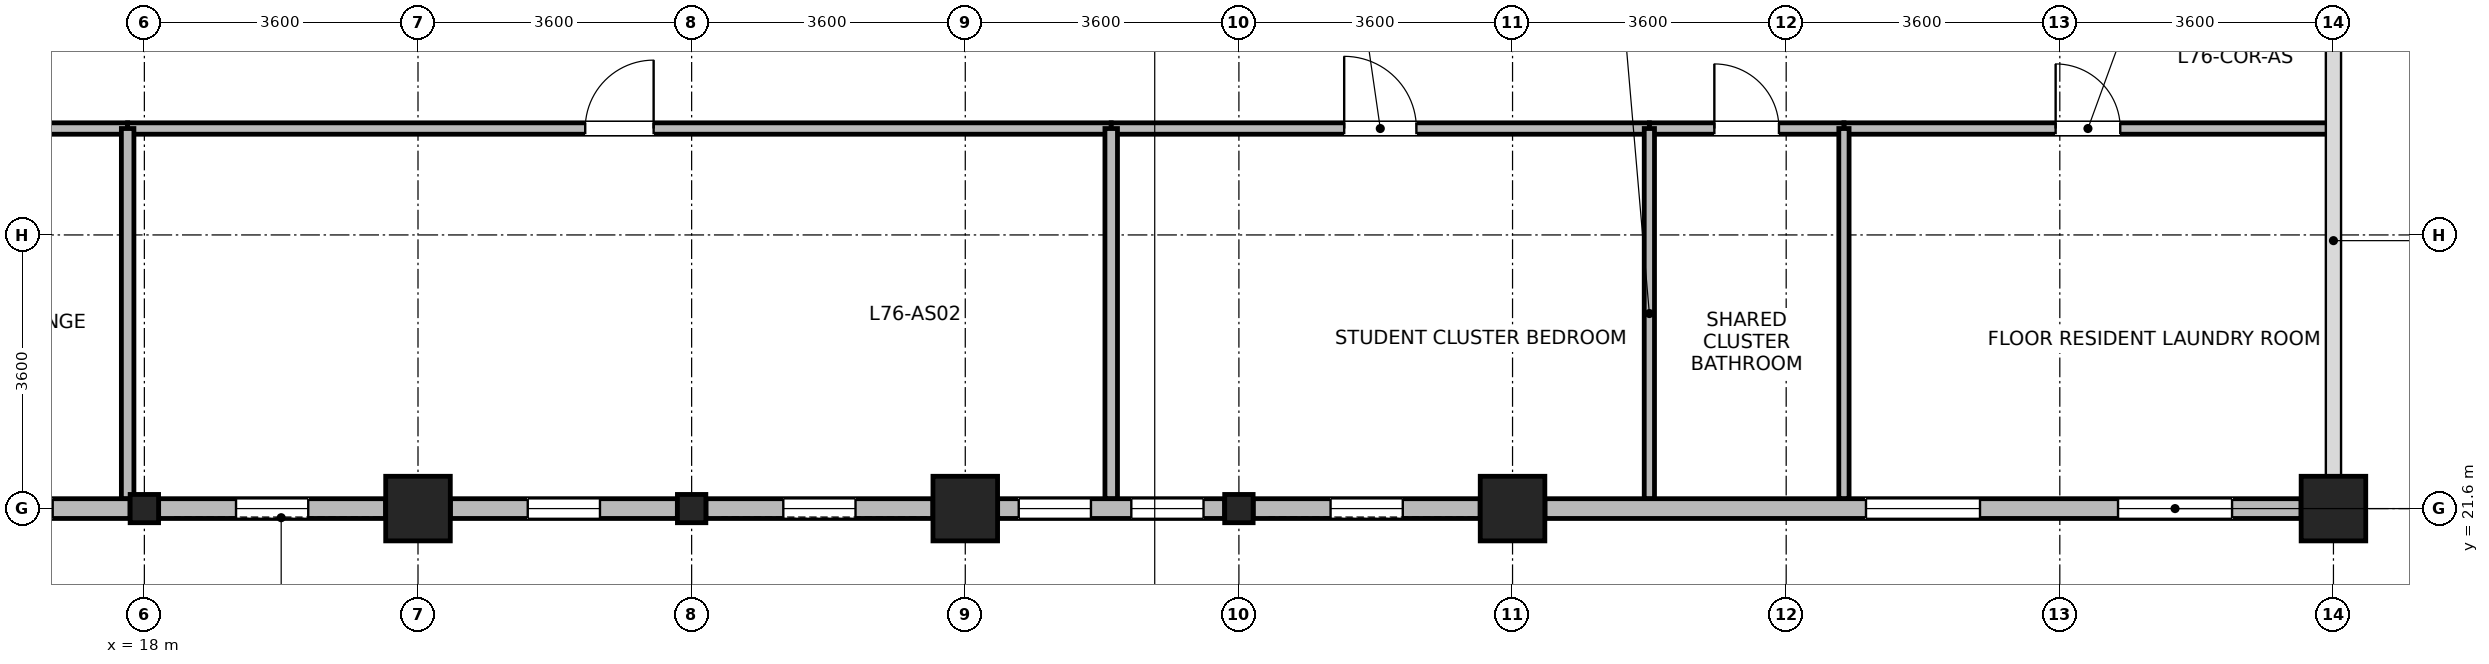
"""IFC4 building model, lengths in metres.
Left out: names, types, materials, properties, quantities, classifications, styles, units other than length and angle.
Written with IfcOpenShell. Run it as: python <this file> out.ifc"""

import sys

from ifc_helpers import new_model, si_unit, direction, frame, frame_2d, origin, origin_2d, place, context, subcontext, project, spatial, rectangle, i_section, extrude, source, transform, mapped, element, fill, save


model = new_model("IFC4")
c1 = context("Model", 3, precision=1e-05, world=origin(), true_north=direction((0.0, 1.0)))
c2 = subcontext(c1, "Body", "Model", "MODEL_VIEW")
j1 = project(units=[si_unit("LENGTHUNIT", "METRE"), si_unit("PLANEANGLEUNIT", "RADIAN")], contexts=[c1])
p1 = place(None, origin())
s1 = spatial("IfcSite", under=j1, at=p1, CompositionType="ELEMENT")
p2 = place(p1, origin())
s2 = spatial("IfcBuilding", under=s1, at=p2, CompositionType="ELEMENT")
p3 = place(p2, frame((0.0, 0.0, 294.3)))
s3 = spatial("IfcBuildingStorey", under=s2, at=p3, CompositionType="ELEMENT", Elevation=294.3)
m1 = source(origin(), c2, "Body", "SweptSolid", [
    extrude(rectangle(XDim=0.85, YDim=0.85, at=origin_2d()), origin(), (0.0, 0.0, 1.0), 3.7),
])
for number, where, z_axis, x_axis in (
    (1, (21.6, 21.6, 0.0), (0.0, 0.0, 1.0), (1.0, 0.0, 0.0)),
    (2, (28.8, 21.6, 0.0), (0.0, 0.0, 1.0), (1.0, 0.0, 0.0)),
    (3, (36.0, 21.6, 0.0), (0.0, 0.0, 1.0), (1.0, 0.0, 0.0)),
    (4, (46.8, 21.6, 0.0), (0.0, 0.0, 1.0), (1.0, 0.0, 0.0)),
):
    element("IfcColumn", number, at=place(p3, frame(where, z_axis=z_axis, x_axis=x_axis)), inside=s3, PredefinedType="COLUMN", context=c2, shape_type="MappedRepresentation", body=[
        mapped(m1, transform((0.0, 0.0, 0.0), x_axis=(1.0, 0.0, 0.0), y_axis=(0.0, 1.0, 0.0), z_axis=(0.0, 0.0, 1.0), scale=1.0)),
    ])
m2 = source(origin(), c2, "Body", "SweptSolid", [
    extrude(i_section(OverallWidth=0.374, OverallDepth=0.372, WebThickness=0.015, FlangeThickness=0.026, FilletRadius=0.015, at=origin_2d()), origin(), (0.0, 0.0, 1.0), 3.7),
])
for number, where, z_axis, x_axis in (
    (5, (18.0, 21.6, 0.0), (0.0, 0.0, 1.0), (1.0, 0.0, 0.0)),
    (6, (25.2, 21.6, 0.0), (0.0, 0.0, 1.0), (1.0, 0.0, 0.0)),
    (7, (32.4, 21.6, 0.0), (0.0, 0.0, 1.0), (1.0, 0.0, 0.0)),
):
    element("IfcColumn", number, at=place(p3, frame(where, z_axis=z_axis, x_axis=x_axis)), inside=s3, PredefinedType="COLUMN", context=c2, shape_type="MappedRepresentation", body=[
        mapped(m2, transform((0.0, 0.0, 0.0), x_axis=(1.0, 0.0, 0.0), y_axis=(0.0, 1.0, 0.0), z_axis=(0.0, 0.0, 1.0), scale=1.0)),
    ])
p4 = place(p3, frame((17.812, 21.6, 0.0), z_axis=(0.0, 0.0, 1.0), x_axis=(-1.0, 0.0, 0.0)))
e8 = element("IfcWall", 8, at=p4, inside=s3, PredefinedType="STANDARD", context=c2, shape_type="SweptSolid", body=[
    extrude(rectangle(XDim=2.986, YDim=0.26, at=frame_2d((1.493, 0.0))), origin(), (0.0, 0.0, 1.0), 2.98),
])
p5 = place(p4, frame((1.018, 0.0, 0.85)))
e9 = element("IfcOpeningElement", 9, at=p5, cuts=e8, PredefinedType="OPENING", context=c2, shape_type="SweptSolid", body=[
    extrude(rectangle(XDim=0.95, YDim=1.75, at=frame_2d((0.475, 0.875))), frame((0.0, 0.14, 0.0), z_axis=(0.0, -1.0, 0.0), x_axis=(1.0, 0.0, 0.0)), (0.0, 0.0, 1.0), 0.28),
])
p6 = place(p3, frame((21.174, 21.6, 0.0), z_axis=(0.0, 0.0, 1.0), x_axis=(-1.0, 0.0, 0.0)))
e10 = element("IfcWall", 10, at=p6, inside=s3, PredefinedType="STANDARD", context=c2, shape_type="SweptSolid", body=[
    extrude(rectangle(XDim=2.986, YDim=0.26, at=frame_2d((1.493, 0.0))), origin(), (0.0, 0.0, 1.0), 2.98),
])
p7 = place(p6, frame((1.018, 0.0, 0.85)))
e11 = element("IfcOpeningElement", 11, at=p7, cuts=e10, PredefinedType="OPENING", context=c2, shape_type="SweptSolid", body=[
    extrude(rectangle(XDim=0.95, YDim=1.75, at=frame_2d((0.475, 0.875))), frame((0.0, 0.14, 0.0), z_axis=(0.0, -1.0, 0.0), x_axis=(1.0, 0.0, 0.0)), (0.0, 0.0, 1.0), 0.28),
])
p8 = place(p3, frame((25.012, 21.6, 0.0), z_axis=(0.0, 0.0, 1.0), x_axis=(-1.0, 0.0, 0.0)))
e12 = element("IfcWall", 12, at=p8, inside=s3, PredefinedType="STANDARD", context=c2, shape_type="SweptSolid", body=[
    extrude(rectangle(XDim=2.986, YDim=0.26, at=frame_2d((1.493, 0.0))), origin(), (0.0, 0.0, 1.0), 2.98),
])
p9 = place(p8, frame((1.018, 0.0, 0.85)))
e13 = element("IfcOpeningElement", 13, at=p9, cuts=e12, PredefinedType="OPENING", context=c2, shape_type="SweptSolid", body=[
    extrude(rectangle(XDim=0.95, YDim=1.75, at=frame_2d((0.475, 0.875))), frame((0.0, 0.14, 0.0), z_axis=(0.0, -1.0, 0.0), x_axis=(1.0, 0.0, 0.0)), (0.0, 0.0, 1.0), 0.28),
])
p10 = place(p3, frame((28.374, 21.6, 0.0), z_axis=(0.0, 0.0, 1.0), x_axis=(-1.0, 0.0, 0.0)))
e14 = element("IfcWall", 14, at=p10, inside=s3, PredefinedType="STANDARD", context=c2, shape_type="SweptSolid", body=[
    extrude(rectangle(XDim=2.986, YDim=0.26, at=frame_2d((1.493, 0.0))), origin(), (0.0, 0.0, 1.0), 2.98),
])
p11 = place(p10, frame((1.018, 0.0, 0.85)))
e15 = element("IfcOpeningElement", 15, at=p11, cuts=e14, PredefinedType="OPENING", context=c2, shape_type="SweptSolid", body=[
    extrude(rectangle(XDim=0.95, YDim=1.75, at=frame_2d((0.475, 0.875))), frame((0.0, 0.14, 0.0), z_axis=(0.0, -1.0, 0.0), x_axis=(1.0, 0.0, 0.0)), (0.0, 0.0, 1.0), 0.28),
])
p12 = place(p3, frame((32.212, 21.6, 0.0), z_axis=(0.0, 0.0, 1.0), x_axis=(-1.0, 0.0, 0.0)))
e16 = element("IfcWall", 16, at=p12, inside=s3, PredefinedType="STANDARD", context=c2, shape_type="SweptSolid", body=[
    extrude(rectangle(XDim=2.986, YDim=0.26, at=frame_2d((1.493, 0.0))), origin(), (0.0, 0.0, 1.0), 2.98),
])
p13 = place(p12, frame((0.278, 0.0, 0.85)))
e17 = element("IfcOpeningElement", 17, at=p13, cuts=e16, PredefinedType="OPENING", context=c2, shape_type="SweptSolid", body=[
    extrude(rectangle(XDim=0.95, YDim=1.75, at=frame_2d((0.475, 0.875))), frame((0.0, 0.14, 0.0), z_axis=(0.0, -1.0, 0.0), x_axis=(1.0, 0.0, 0.0)), (0.0, 0.0, 1.0), 0.28),
])
p14 = place(p12, frame((1.759, 0.0, 0.85)))
e18 = element("IfcOpeningElement", 18, at=p14, cuts=e16, PredefinedType="OPENING", context=c2, shape_type="SweptSolid", body=[
    extrude(rectangle(XDim=0.95, YDim=1.75, at=frame_2d((0.475, 0.875))), frame((0.0, 0.14, 0.0), z_axis=(0.0, -1.0, 0.0), x_axis=(1.0, 0.0, 0.0)), (0.0, 0.0, 1.0), 0.28),
])
p15 = place(p3, frame((35.574, 21.6, 0.0), z_axis=(0.0, 0.0, 1.0), x_axis=(-1.0, 0.0, 0.0)))
e19 = element("IfcWall", 19, at=p15, inside=s3, PredefinedType="STANDARD", context=c2, shape_type="SweptSolid", body=[
    extrude(rectangle(XDim=2.986, YDim=0.26, at=frame_2d((1.493, 0.0))), origin(), (0.0, 0.0, 1.0), 2.98),
])
p16 = place(p15, frame((1.018, 0.0, 0.85)))
e20 = element("IfcOpeningElement", 20, at=p16, cuts=e19, PredefinedType="OPENING", context=c2, shape_type="SweptSolid", body=[
    extrude(rectangle(XDim=0.95, YDim=1.75, at=frame_2d((0.475, 0.875))), frame((0.0, 0.14, 0.0), z_axis=(0.0, -1.0, 0.0), x_axis=(1.0, 0.0, 0.0)), (0.0, 0.0, 1.0), 0.28),
])
p17 = place(p3, frame((46.374, 21.6, 0.0), z_axis=(0.0, 0.0, 1.0), x_axis=(-1.0, 0.0, 0.0)))
e21 = element("IfcWall", 21, at=p17, inside=s3, PredefinedType="STANDARD", context=c2, shape_type="SweptSolid", body=[
    extrude(rectangle(XDim=9.948, YDim=0.26, at=frame_2d((4.974, 0.0))), origin(), (0.0, 0.0, 1.0), 2.98),
])
p18 = place(p17, frame((0.908, 0.0, 0.85)))
e22 = element("IfcOpeningElement", 22, at=p18, cuts=e21, PredefinedType="OPENING", context=c2, shape_type="SweptSolid", body=[
    extrude(rectangle(XDim=1.5, YDim=1.85, at=frame_2d((0.75, 0.925))), frame((0.0, 0.14, 0.0), z_axis=(0.0, -1.0, 0.0), x_axis=(1.0, 0.0, 0.0)), (0.0, 0.0, 1.0), 0.28),
])
p19 = place(p17, frame((4.224, 0.0, 0.85)))
e23 = element("IfcOpeningElement", 23, at=p19, cuts=e21, PredefinedType="OPENING", context=c2, shape_type="SweptSolid", body=[
    extrude(rectangle(XDim=1.5, YDim=1.85, at=frame_2d((0.75, 0.925))), frame((0.0, 0.14, 0.0), z_axis=(0.0, -1.0, 0.0), x_axis=(1.0, 0.0, 0.0)), (0.0, 0.0, 1.0), 0.28),
])
p20 = place(p3, frame((3.732, 26.6, 0.0), z_axis=(0.0, 0.0, 1.0), x_axis=(1.0, 0.0, 0.0)))
e24 = element("IfcWall", 24, at=p20, inside=s3, PredefinedType="PARTITIONING", context=c2, shape_type="SweptSolid", body=[
    extrude(rectangle(XDim=14.048, YDim=0.15, at=frame_2d((7.024, 0.0))), origin(), (0.0, 0.0, 1.0), 3.38),
])
p21 = place(p20, frame((6.374, 0.0, 0.0)))
e25 = element("IfcOpeningElement", 25, at=p21, cuts=e24, PredefinedType="OPENING", context=c2, shape_type="SweptSolid", body=[
    extrude(rectangle(XDim=1.3, YDim=2.12, at=frame_2d((0.65, 1.06))), frame((0.0, 0.085, 0.0), z_axis=(0.0, -1.0, 0.0), x_axis=(1.0, 0.0, 0.0)), (0.0, 0.0, 1.0), 0.17),
])
p22 = place(p3, frame((17.78, 26.6, 0.0), z_axis=(0.0, 0.0, 1.0), x_axis=(1.0, 0.0, 0.0)))
e26 = element("IfcWall", 26, at=p22, inside=s3, PredefinedType="PARTITIONING", context=c2, shape_type="SweptSolid", body=[
    extrude(rectangle(XDim=12.94, YDim=0.15, at=frame_2d((6.47, 0.0))), origin(), (0.0, 0.0, 1.0), 3.38),
])
p23 = place(p22, frame((6.02, 0.0, 0.0)))
e27 = element("IfcOpeningElement", 27, at=p23, cuts=e26, PredefinedType="OPENING", context=c2, shape_type="SweptSolid", body=[
    extrude(rectangle(XDim=0.9, YDim=2.08, at=frame_2d((0.45, 1.04))), frame((0.0, 0.085, 0.0), z_axis=(0.0, -1.0, 0.0), x_axis=(1.0, 0.0, 0.0)), (0.0, 0.0, 1.0), 0.17),
])
p24 = place(p3, frame((30.72, 26.6, 0.0), z_axis=(0.0, 0.0, 1.0), x_axis=(1.0, 0.0, 0.0)))
e28 = element("IfcWall", 28, at=p24, inside=s3, PredefinedType="PARTITIONING", context=c2, shape_type="SweptSolid", body=[
    extrude(rectangle(XDim=7.08, YDim=0.15, at=frame_2d((3.54, 0.0))), origin(), (0.0, 0.0, 1.0), 3.38),
])
p25 = place(p24, frame((3.065, 0.0, 0.0)))
e29 = element("IfcOpeningElement", 29, at=p25, cuts=e28, PredefinedType="OPENING", context=c2, shape_type="SweptSolid", body=[
    extrude(rectangle(XDim=0.95, YDim=2.1, at=frame_2d((0.475, 1.05))), frame((0.0, 0.085, 0.0), z_axis=(0.0, -1.0, 0.0), x_axis=(1.0, 0.0, 0.0)), (0.0, 0.0, 1.0), 0.17),
])
p26 = place(p3, frame((40.36, 26.6, 0.0), z_axis=(0.0, 0.0, 1.0), x_axis=(1.0, 0.0, 0.0)))
e30 = element("IfcWall", 30, at=p26, inside=s3, PredefinedType="PARTITIONING", context=c2, shape_type="SweptSolid", body=[
    extrude(rectangle(XDim=6.42, YDim=0.15, at=frame_2d((3.21, 0.0))), origin(), (0.0, 0.0, 1.0), 3.38),
])
p27 = place(p26, frame((2.785, 0.0, 0.0)))
e31 = element("IfcOpeningElement", 31, at=p27, cuts=e30, PredefinedType="OPENING", context=c2, shape_type="SweptSolid", body=[
    extrude(rectangle(XDim=0.85, YDim=2.04, at=frame_2d((0.425, 1.02))), frame((0.0, 0.085, 0.0), z_axis=(0.0, -1.0, 0.0), x_axis=(1.0, 0.0, 0.0)), (0.0, 0.0, 1.0), 0.17),
])
p28 = place(p3, frame((37.8, 26.6, 0.0), z_axis=(0.0, 0.0, 1.0), x_axis=(1.0, 0.0, 0.0)))
e32 = element("IfcWall", 32, at=p28, inside=s3, PredefinedType="PARTITIONING", context=c2, shape_type="SweptSolid", body=[
    extrude(rectangle(XDim=2.56, YDim=0.15, at=frame_2d((1.28, 0.0))), origin(), (0.0, 0.0, 1.0), 3.38),
])
p29 = place(p28, frame((0.855, 0.0, 0.0)))
e33 = element("IfcOpeningElement", 33, at=p29, cuts=e32, PredefinedType="OPENING", context=c2, shape_type="SweptSolid", body=[
    extrude(rectangle(XDim=0.85, YDim=2.04, at=frame_2d((0.425, 1.02))), frame((0.0, 0.085, 0.0), z_axis=(0.0, -1.0, 0.0), x_axis=(1.0, 0.0, 0.0)), (0.0, 0.0, 1.0), 0.17),
])
for number, where, z_axis, x_axis in (
    (34, (17.78, 21.732, 0.0), (0.0, 0.0, 1.0), (0.0, 1.0, 0.0)),
    (35, (30.72, 21.732, 0.0), (0.0, 0.0, 1.0), (0.0, 1.0, 0.0)),
):
    element("IfcWall", number, at=place(p3, frame(where, z_axis=z_axis, x_axis=x_axis)), inside=s3, PredefinedType="PARTITIONING", context=c2, shape_type="SweptSolid", body=[
        extrude(rectangle(XDim=4.868, YDim=0.165, at=frame_2d((2.434, 0.0))), origin(), (0.0, 0.0, 1.0), 3.38),
    ])
for number, where, z_axis, x_axis in (
    (36, (37.8, 21.732, 0.0), (0.0, 0.0, 1.0), (0.0, 1.0, 0.0)),
    (37, (40.36, 21.732, 0.0), (0.0, 0.0, 1.0), (0.0, 1.0, 0.0)),
):
    element("IfcWall", number, at=place(p3, frame(where, z_axis=z_axis, x_axis=x_axis)), inside=s3, PredefinedType="PARTITIONING", context=c2, shape_type="SweptSolid", body=[
        extrude(rectangle(XDim=4.868, YDim=0.135, at=frame_2d((2.434, 0.0))), origin(), (0.0, 0.0, 1.0), 3.38),
    ])
p30 = place(p5, origin())
e38 = element("IfcWindow", 38, at=p30, inside=s3, PartitioningType="SINGLE_PANEL", PredefinedType="WINDOW", context=c2, shape_type="SweptSolid", body=[
    extrude(rectangle(XDim=0.95, YDim=1.75, at=frame_2d((0.475, 0.875))), frame((0.0, 0.03, 0.0), z_axis=(0.0, -1.0, 0.0), x_axis=(1.0, 0.0, 0.0)), (0.0, 0.0, 1.0), 0.06),
])
fill(e9, e38)
p31 = place(p7, origin())
e39 = element("IfcWindow", 39, at=p31, inside=s3, PartitioningType="SINGLE_PANEL", PredefinedType="WINDOW", context=c2, shape_type="SweptSolid", body=[
    extrude(rectangle(XDim=0.95, YDim=1.75, at=frame_2d((0.475, 0.875))), frame((0.0, 0.03, 0.0), z_axis=(0.0, -1.0, 0.0), x_axis=(1.0, 0.0, 0.0)), (0.0, 0.0, 1.0), 0.06),
])
fill(e11, e39)
p32 = place(p9, origin())
e40 = element("IfcWindow", 40, at=p32, inside=s3, PartitioningType="SINGLE_PANEL", PredefinedType="WINDOW", context=c2, shape_type="SweptSolid", body=[
    extrude(rectangle(XDim=0.95, YDim=1.75, at=frame_2d((0.475, 0.875))), frame((0.0, 0.03, 0.0), z_axis=(0.0, -1.0, 0.0), x_axis=(1.0, 0.0, 0.0)), (0.0, 0.0, 1.0), 0.06),
])
fill(e13, e40)
p33 = place(p11, origin())
e41 = element("IfcWindow", 41, at=p33, inside=s3, PartitioningType="SINGLE_PANEL", PredefinedType="WINDOW", context=c2, shape_type="SweptSolid", body=[
    extrude(rectangle(XDim=0.95, YDim=1.75, at=frame_2d((0.475, 0.875))), frame((0.0, 0.03, 0.0), z_axis=(0.0, -1.0, 0.0), x_axis=(1.0, 0.0, 0.0)), (0.0, 0.0, 1.0), 0.06),
])
fill(e15, e41)
p34 = place(p13, origin())
e42 = element("IfcWindow", 42, at=p34, inside=s3, PartitioningType="SINGLE_PANEL", PredefinedType="WINDOW", context=c2, shape_type="SweptSolid", body=[
    extrude(rectangle(XDim=0.95, YDim=1.75, at=frame_2d((0.475, 0.875))), frame((0.0, 0.03, 0.0), z_axis=(0.0, -1.0, 0.0), x_axis=(1.0, 0.0, 0.0)), (0.0, 0.0, 1.0), 0.06),
])
fill(e17, e42)
p35 = place(p14, origin())
e43 = element("IfcWindow", 43, at=p35, inside=s3, PartitioningType="SINGLE_PANEL", PredefinedType="WINDOW", context=c2, shape_type="SweptSolid", body=[
    extrude(rectangle(XDim=0.95, YDim=1.75, at=frame_2d((0.475, 0.875))), frame((0.0, 0.03, 0.0), z_axis=(0.0, -1.0, 0.0), x_axis=(1.0, 0.0, 0.0)), (0.0, 0.0, 1.0), 0.06),
])
fill(e18, e43)
p36 = place(p16, origin())
e44 = element("IfcWindow", 44, at=p36, inside=s3, PartitioningType="SINGLE_PANEL", PredefinedType="WINDOW", context=c2, shape_type="SweptSolid", body=[
    extrude(rectangle(XDim=0.95, YDim=1.75, at=frame_2d((0.475, 0.875))), frame((0.0, 0.03, 0.0), z_axis=(0.0, -1.0, 0.0), x_axis=(1.0, 0.0, 0.0)), (0.0, 0.0, 1.0), 0.06),
])
fill(e20, e44)
p37 = place(p18, origin())
e45 = element("IfcWindow", 45, at=p37, inside=s3, PartitioningType="SINGLE_PANEL", PredefinedType="WINDOW", context=c2, shape_type="SweptSolid", body=[
    extrude(rectangle(XDim=1.5, YDim=1.85, at=frame_2d((0.75, 0.925))), frame((0.0, 0.03, 0.0), z_axis=(0.0, -1.0, 0.0), x_axis=(1.0, 0.0, 0.0)), (0.0, 0.0, 1.0), 0.06),
])
fill(e22, e45)
p38 = place(p19, origin())
e46 = element("IfcWindow", 46, at=p38, inside=s3, PartitioningType="SINGLE_PANEL", PredefinedType="WINDOW", context=c2, shape_type="SweptSolid", body=[
    extrude(rectangle(XDim=1.5, YDim=1.85, at=frame_2d((0.75, 0.925))), frame((0.0, 0.03, 0.0), z_axis=(0.0, -1.0, 0.0), x_axis=(1.0, 0.0, 0.0)), (0.0, 0.0, 1.0), 0.06),
])
fill(e23, e46)
p39 = place(p23, origin())
e47 = element("IfcDoor", 47, at=p39, inside=s3, OperationType="SINGLE_SWING_RIGHT", PredefinedType="DOOR", context=c2, shape_type="SweptSolid", body=[
    extrude(rectangle(XDim=0.9, YDim=2.08, at=frame_2d((0.45, 1.04))), frame((0.0, 0.025, 0.0), z_axis=(0.0, -1.0, 0.0), x_axis=(1.0, 0.0, 0.0)), (0.0, 0.0, 1.0), 0.05),
])
fill(e27, e47)
p40 = place(p25, origin())
e48 = element("IfcDoor", 48, at=p40, inside=s3, OperationType="SINGLE_SWING_LEFT", PredefinedType="DOOR", context=c2, shape_type="SweptSolid", body=[
    extrude(rectangle(XDim=0.95, YDim=2.1, at=frame_2d((0.475, 1.05))), frame((0.0, 0.025, 0.0), z_axis=(0.0, -1.0, 0.0), x_axis=(1.0, 0.0, 0.0)), (0.0, 0.0, 1.0), 0.05),
])
fill(e29, e48)
p41 = place(p27, origin())
e49 = element("IfcDoor", 49, at=p41, inside=s3, OperationType="SINGLE_SWING_LEFT", PredefinedType="DOOR", context=c2, shape_type="SweptSolid", body=[
    extrude(rectangle(XDim=0.85, YDim=2.04, at=frame_2d((0.425, 1.02))), frame((0.0, 0.025, 0.0), z_axis=(0.0, -1.0, 0.0), x_axis=(1.0, 0.0, 0.0)), (0.0, 0.0, 1.0), 0.05),
])
fill(e31, e49)
p42 = place(p29, origin())
e50 = element("IfcDoor", 50, at=p42, inside=s3, OperationType="SINGLE_SWING_LEFT", PredefinedType="DOOR", context=c2, shape_type="SweptSolid", body=[
    extrude(rectangle(XDim=0.85, YDim=2.04, at=frame_2d((0.425, 1.02))), frame((0.0, 0.025, 0.0), z_axis=(0.0, -1.0, 0.0), x_axis=(1.0, 0.0, 0.0)), (0.0, 0.0, 1.0), 0.05),
])
fill(e33, e50)
save(model, sys.argv[1])
